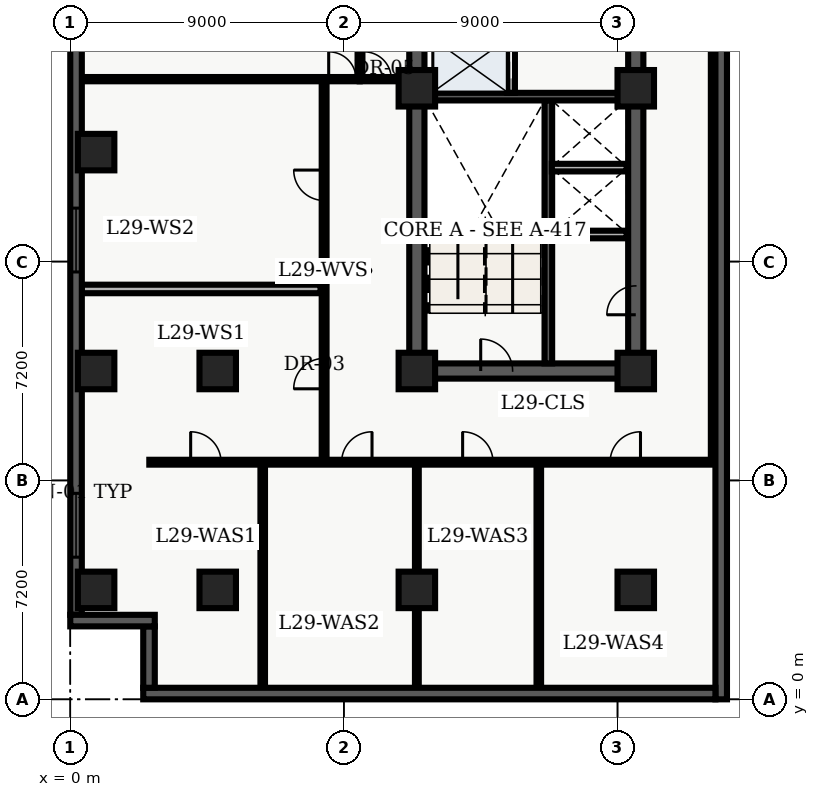
"""IFC4 building model, lengths in metres.
Left out: names, types, materials, properties, quantities, classifications, styles, units other than length and angle.
Written with IfcOpenShell. Run it as: python <this file> out.ifc"""

import sys

from ifc_helpers import new_model, entity, si_unit, converted_unit, direction, frame, origin_with_axes, origin_2d_with_axis, place, context, subcontext, project, spatial, polyline, rectangle, outline, extrude, element, fill, save


model = new_model("IFC4")
c1 = context("Model", 3, precision=1e-05, world=origin_with_axes(), true_north=direction((0.0, 1.0)))
c2 = subcontext(c1, "Body", "Model", "MODEL_VIEW")
j1 = project(units=[si_unit("LENGTHUNIT", "METRE"), converted_unit("PLANEANGLEUNIT", "DEGREE", entity("IfcPlaneAngleMeasure", 0.017), si_unit("PLANEANGLEUNIT", "RADIAN"), dimensions=[0, 0, 0, 0, 0, 0, 0])], contexts=[c1])
p1 = place(None, origin_with_axes())
s1 = spatial("IfcSite", under=j1, at=p1, CompositionType="ELEMENT")
p2 = place(p1, origin_with_axes())
s2 = spatial("IfcBuilding", under=s1, at=p2, CompositionType="ELEMENT")
p3 = place(p2, frame((0.0, 0.0, 120.3), z_axis=(0.0, 0.0, 1.0), x_axis=(1.0, 0.0, 0.0)))
s3 = spatial("IfcBuildingStorey", under=s2, at=p3, CompositionType="ELEMENT", Elevation=120.3)
p4 = place(p3, frame((11.4, 10.8, 0.0), z_axis=(0.0, 0.0, 1.0), x_axis=(0.0, 1.0, 0.0)))
e1 = element("IfcWall", 1, at=p4, inside=s3, PredefinedType="SHEAR", context=c2, shape_type="SweptSolid", body=[
    extrude(outline(polyline([(0.0, -0.25), (27.0, -0.25), (27.0, 0.25), (0.0, 0.25), (0.0, -0.25)])), origin_with_axes(), (0.0, 0.0, 1.0), 3.6),
])
p5 = place(p3, frame((11.4, 10.8, 0.0), z_axis=(0.0, 0.0, 1.0), x_axis=(1.0, 0.0, 0.0)))
e2 = element("IfcWall", 2, at=p5, inside=s3, PredefinedType="SHEAR", context=c2, shape_type="SweptSolid", body=[
    extrude(outline(polyline([(0.0, -0.25), (7.2, -0.25), (7.2, 0.25), (0.0, 0.25), (0.0, -0.25)])), origin_with_axes(), (0.0, 0.0, 1.0), 3.6),
])
p6 = place(p5, frame((2.625, 0.0, 0.0), z_axis=(0.0, 0.0, 1.0), x_axis=(1.0, 0.0, 0.0)))
e3 = element("IfcOpeningElement", 3, at=p6, cuts=e2, PredefinedType="OPENING", context=c2, shape_type="SweptSolid", body=[
    extrude(rectangle(XDim=1.05, YDim=0.52, at=origin_2d_with_axis()), origin_with_axes(), (0.0, 0.0, 1.0), 2.15),
])
p7 = place(p3, frame((18.6, 10.8, 0.0), z_axis=(0.0, 0.0, 1.0), x_axis=(0.0, 1.0, 0.0)))
e4 = element("IfcWall", 4, at=p7, inside=s3, PredefinedType="SHEAR", context=c2, shape_type="SweptSolid", body=[
    extrude(outline(polyline([(0.0, -0.25), (13.5, -0.25), (13.5, 0.25), (0.0, 0.25), (0.0, -0.25)])), origin_with_axes(), (0.0, 0.0, 1.0), 3.6),
])
p8 = place(p7, frame((11.125, 0.0, 0.0), z_axis=(0.0, 0.0, 1.0), x_axis=(1.0, 0.0, 0.0)))
e5 = element("IfcOpeningElement", 5, at=p8, cuts=e4, PredefinedType="OPENING", context=c2, shape_type="SweptSolid", body=[
    extrude(rectangle(XDim=1.05, YDim=0.52, at=origin_2d_with_axis()), origin_with_axes(), (0.0, 0.0, 1.0), 2.15),
])
p9 = place(p7, frame((2.325, 0.0, 0.0), z_axis=(0.0, 0.0, 1.0), x_axis=(1.0, 0.0, 0.0)))
e6 = element("IfcOpeningElement", 6, at=p9, cuts=e4, PredefinedType="OPENING", context=c2, shape_type="SweptSolid", body=[
    extrude(rectangle(XDim=0.95, YDim=0.52, at=origin_2d_with_axis()), origin_with_axes(), (0.0, 0.0, 1.0), 2.15),
])
p10 = place(p3, frame((15.725, 11.05, 0.0), z_axis=(0.0, 0.0, 1.0), x_axis=(0.0, 1.0, 0.0)))
e7 = element("IfcWall", 7, at=p10, inside=s3, PredefinedType="SHEAR", context=c2, shape_type="SweptSolid", body=[
    extrude(outline(polyline([(0.0, -0.125), (8.65, -0.125), (8.65, 0.125), (0.0, 0.125), (0.0, -0.125)])), origin_with_axes(), (0.0, 0.0, 1.0), 3.6),
])
p11 = place(p3, frame((11.65, 19.825, 0.0), z_axis=(0.0, 0.0, 1.0), x_axis=(1.0, 0.0, 0.0)))
e8 = element("IfcWall", 8, at=p11, inside=s3, PredefinedType="SHEAR", context=c2, shape_type="SweptSolid", body=[
    extrude(outline(polyline([(0.0, -0.125), (6.7, -0.125), (6.7, 0.125), (0.0, 0.125), (0.0, -0.125)])), origin_with_axes(), (0.0, 0.0, 1.0), 3.6),
])
p12 = place(p3, frame((14.5, 19.95, 0.0), z_axis=(0.0, 0.0, 1.0), x_axis=(0.0, 1.0, 0.0)))
e9 = element("IfcWall", 9, at=p12, inside=s3, PredefinedType="SOLIDWALL", context=c2, shape_type="SweptSolid", body=[
    extrude(outline(polyline([(0.0, -0.125), (6.25, -0.125), (6.25, 0.125), (0.0, 0.125), (0.0, -0.125)])), origin_with_axes(), (0.0, 0.0, 1.0), 2.64),
])
p13 = place(p12, frame((1.025, 0.0, 0.0), z_axis=(0.0, 0.0, 1.0), x_axis=(1.0, 0.0, 0.0)))
e10 = element("IfcOpeningElement", 10, at=p13, cuts=e9, PredefinedType="OPENING", context=c2, shape_type="SweptSolid", body=[
    extrude(rectangle(XDim=1.1, YDim=0.27, at=origin_2d_with_axis()), origin_with_axes(), (0.0, 0.0, 1.0), 2.15),
])
p14 = place(p12, frame((2.975, 0.0, 0.0), z_axis=(0.0, 0.0, 1.0), x_axis=(1.0, 0.0, 0.0)))
e11 = element("IfcOpeningElement", 11, at=p14, cuts=e9, PredefinedType="OPENING", context=c2, shape_type="SweptSolid", body=[
    extrude(rectangle(XDim=1.1, YDim=0.27, at=origin_2d_with_axis()), origin_with_axes(), (0.0, 0.0, 1.0), 2.15),
])
p15 = place(p12, frame((5.425, 0.0, 0.0), z_axis=(0.0, 0.0, 1.0), x_axis=(1.0, 0.0, 0.0)))
e12 = element("IfcOpeningElement", 12, at=p15, cuts=e9, PredefinedType="OPENING", context=c2, shape_type="SweptSolid", body=[
    extrude(rectangle(XDim=1.2, YDim=0.27, at=origin_2d_with_axis()), origin_with_axes(), (0.0, 0.0, 1.0), 2.15),
])
for number, where, z_axis, x_axis in (
    (13, (11.4, 3.6, 0.0), (0.0, 0.0, 1.0), (1.0, 0.0, 0.0)),
    (14, (11.4, 10.8, 0.0), (0.0, 0.0, 1.0), (1.0, 0.0, 0.0)),
    (15, (11.4, 20.1, 0.0), (0.0, 0.0, 1.0), (1.0, 0.0, 0.0)),
    (16, (18.6, 3.6, 0.0), (0.0, 0.0, 1.0), (1.0, 0.0, 0.0)),
    (17, (18.6, 10.8, 0.0), (0.0, 0.0, 1.0), (1.0, 0.0, 0.0)),
    (18, (18.6, 20.1, 0.0), (0.0, 0.0, 1.0), (1.0, 0.0, 0.0)),
    (19, (4.85, 3.6, 0.0), (0.0, 0.0, 1.0), (1.0, 0.0, 0.0)),
    (20, (4.85, 10.8, 0.0), (0.0, 0.0, 1.0), (1.0, 0.0, 0.0)),
    (21, (0.85, 3.6, 0.0), (0.0, 0.0, 1.0), (1.0, 0.0, 0.0)),
    (22, (0.85, 10.8, 0.0), (0.0, 0.0, 1.0), (1.0, 0.0, 0.0)),
    (23, (0.85, 18.0, 0.0), (0.0, 0.0, 1.0), (1.0, 0.0, 0.0)),
):
    element("IfcColumn", number, at=place(p3, frame(where, z_axis=z_axis, x_axis=x_axis)), inside=s3, PredefinedType="COLUMN", context=c2, shape_type="SweptSolid", body=[
        extrude(rectangle(XDim=1.2, YDim=1.2, at=origin_2d_with_axis()), origin_with_axes(), (0.0, 0.0, 1.0), 3.9),
    ])
for number, where, z_axis, x_axis in (
    (24, (15.84, 15.29, 0.0), (0.0, 0.0, 1.0), (1.0, 0.0, 0.0)),
    (25, (15.84, 17.49, 0.0), (0.0, 0.0, 1.0), (1.0, 0.0, 0.0)),
):
    element("IfcWall", number, at=place(p3, frame(where, z_axis=z_axis, x_axis=x_axis)), inside=s3, PredefinedType="SOLIDWALL", context=c2, shape_type="SweptSolid", body=[
        extrude(outline(polyline([(0.0, -0.125), (2.46, -0.125), (2.46, 0.125), (0.0, 0.125), (0.0, -0.125)])), origin_with_axes(), (0.0, 0.0, 1.0), 2.64),
    ])
p16 = place(p3, frame((9.52, 20.4, 0.0), z_axis=(0.0, 0.0, 1.0), x_axis=(0.0, 1.0, 0.0)))
e26 = element("IfcWall", 26, at=p16, inside=s3, PredefinedType="PARTITIONING", context=c2, shape_type="SweptSolid", body=[
    extrude(outline(polyline([(0.0, -0.07), (4.0, -0.07), (4.0, 0.07), (0.0, 0.07), (0.0, -0.07)])), origin_with_axes(), (0.0, 0.0, 1.0), 2.64),
])
p17 = place(p3, frame((9.52, 20.4, 0.0), z_axis=(0.0, 0.0, 1.0), x_axis=(1.0, 0.0, 0.0)))
e27 = element("IfcWall", 27, at=p17, inside=s3, PredefinedType="PARTITIONING", context=c2, shape_type="SweptSolid", body=[
    extrude(outline(polyline([(0.0, -0.07), (1.58, -0.07), (1.58, 0.07), (0.0, 0.07), (0.0, -0.07)])), origin_with_axes(), (0.0, 0.0, 1.0), 2.64),
])
p18 = place(p17, frame((0.59, 0.0, 0.0), z_axis=(0.0, 0.0, 1.0), x_axis=(1.0, 0.0, 0.0)))
e28 = element("IfcOpeningElement", 28, at=p18, cuts=e27, PredefinedType="OPENING", context=c2, shape_type="SweptSolid", body=[
    extrude(rectangle(XDim=0.9, YDim=0.16, at=origin_2d_with_axis()), origin_with_axes(), (0.0, 0.0, 1.0), 2.15),
])
p19 = place(p3, frame((2.6, 7.8, 0.0), z_axis=(0.0, 0.0, 1.0), x_axis=(1.0, 0.0, 0.0)))
e29 = element("IfcWall", 29, at=p19, inside=s3, PredefinedType="PARTITIONING", context=c2, shape_type="SweptSolid", body=[
    extrude(outline(polyline([(0.0, -0.08), (18.625, -0.08), (18.625, 0.08), (0.0, 0.08), (0.0, -0.08)])), origin_with_axes(), (0.0, 0.0, 1.0), 2.64),
])
p20 = place(p19, frame((1.86, 0.0, 0.0), z_axis=(0.0, 0.0, 1.0), x_axis=(1.0, 0.0, 0.0)))
e30 = element("IfcOpeningElement", 30, at=p20, cuts=e29, PredefinedType="OPENING", context=c2, shape_type="SweptSolid", body=[
    extrude(rectangle(XDim=1.0, YDim=0.18, at=origin_2d_with_axis()), origin_with_axes(), (0.0, 0.0, 1.0), 2.15),
])
p21 = place(p19, frame((6.825, 0.0, 0.0), z_axis=(0.0, 0.0, 1.0), x_axis=(1.0, 0.0, 0.0)))
e31 = element("IfcOpeningElement", 31, at=p21, cuts=e29, PredefinedType="OPENING", context=c2, shape_type="SweptSolid", body=[
    extrude(rectangle(XDim=1.0, YDim=0.18, at=origin_2d_with_axis()), origin_with_axes(), (0.0, 0.0, 1.0), 2.15),
])
p22 = place(p19, frame((10.806, 0.0, 0.0), z_axis=(0.0, 0.0, 1.0), x_axis=(1.0, 0.0, 0.0)))
e32 = element("IfcOpeningElement", 32, at=p22, cuts=e29, PredefinedType="OPENING", context=c2, shape_type="SweptSolid", body=[
    extrude(rectangle(XDim=1.0, YDim=0.18, at=origin_2d_with_axis()), origin_with_axes(), (0.0, 0.0, 1.0), 2.15),
])
p23 = place(p19, frame((15.655, 0.0, 0.0), z_axis=(0.0, 0.0, 1.0), x_axis=(1.0, 0.0, 0.0)))
e33 = element("IfcOpeningElement", 33, at=p23, cuts=e29, PredefinedType="OPENING", context=c2, shape_type="SweptSolid", body=[
    extrude(rectangle(XDim=1.0, YDim=0.18, at=origin_2d_with_axis()), origin_with_axes(), (0.0, 0.0, 1.0), 2.15),
])
p24 = place(p3, frame((21.15, 7.8, 0.0), z_axis=(0.0, 0.0, 1.0), x_axis=(0.0, 1.0, 0.0)))
e34 = element("IfcWall", 34, at=p24, inside=s3, PredefinedType="PARTITIONING", context=c2, shape_type="SweptSolid", body=[
    extrude(outline(polyline([(0.0, -0.08), (32.7, -0.08), (32.7, 0.08), (0.0, 0.08), (0.0, -0.08)])), origin_with_axes(), (0.0, 0.0, 1.0), 2.64),
])
p25 = place(p3, frame((8.35, 7.8, 0.0), z_axis=(0.0, 0.0, 1.0), x_axis=(0.0, 1.0, 0.0)))
e35 = element("IfcWall", 35, at=p25, inside=s3, PredefinedType="PARTITIONING", context=c2, shape_type="SweptSolid", body=[
    extrude(outline(polyline([(0.0, -0.08), (12.6, -0.08), (12.6, 0.08), (0.0, 0.08), (0.0, -0.08)])), origin_with_axes(), (0.0, 0.0, 1.0), 2.64),
])
p26 = place(p25, frame((2.914, 0.0, 0.0), z_axis=(0.0, 0.0, 1.0), x_axis=(1.0, 0.0, 0.0)))
e36 = element("IfcOpeningElement", 36, at=p26, cuts=e35, PredefinedType="OPENING", context=c2, shape_type="SweptSolid", body=[
    extrude(rectangle(XDim=1.0, YDim=0.18, at=origin_2d_with_axis()), origin_with_axes(), (0.0, 0.0, 1.0), 2.15),
])
p27 = place(p25, frame((9.11, 0.0, 0.0), z_axis=(0.0, 0.0, 1.0), x_axis=(1.0, 0.0, 0.0)))
e37 = element("IfcOpeningElement", 37, at=p27, cuts=e35, PredefinedType="OPENING", context=c2, shape_type="SweptSolid", body=[
    extrude(rectangle(XDim=1.0, YDim=0.18, at=origin_2d_with_axis()), origin_with_axes(), (0.0, 0.0, 1.0), 2.15),
])
p28 = place(p3, frame((0.36, 20.4, 0.0), z_axis=(0.0, 0.0, 1.0), x_axis=(1.0, 0.0, 0.0)))
e38 = element("IfcWall", 38, at=p28, inside=s3, PredefinedType="PARTITIONING", context=c2, shape_type="SweptSolid", body=[
    extrude(outline(polyline([(0.0, -0.07), (9.16, -0.07), (9.16, 0.07), (0.0, 0.07), (0.0, -0.07)])), origin_with_axes(), (0.0, 0.0, 1.0), 2.64),
])
p29 = place(p28, frame((8.59, 0.0, 0.0), z_axis=(0.0, 0.0, 1.0), x_axis=(1.0, 0.0, 0.0)))
e39 = element("IfcOpeningElement", 39, at=p29, cuts=e38, PredefinedType="OPENING", context=c2, shape_type="SweptSolid", body=[
    extrude(rectangle(XDim=0.9, YDim=0.16, at=origin_2d_with_axis()), origin_with_axes(), (0.0, 0.0, 1.0), 2.15),
])
p30 = place(p3, frame((0.375, 13.499, 0.0), z_axis=(0.0, 0.0, 1.0), x_axis=(1.0, 0.0, 0.0)))
e40 = element("IfcWall", 40, at=p30, inside=s3, PredefinedType="PARTITIONING", context=c2, shape_type="SweptSolid", body=[
    extrude(outline(polyline([(0.0, -0.14), (7.855, -0.14), (7.855, 0.14), (0.0, 0.14), (0.0, -0.14)])), origin_with_axes(), (0.0, 0.0, 1.0), 2.64),
])
p31 = place(p3, frame((6.33, 0.36, 0.0), z_axis=(0.0, 0.0, 1.0), x_axis=(0.0, 1.0, 0.0)))
e41 = element("IfcWall", 41, at=p31, inside=s3, PredefinedType="PARTITIONING", context=c2, shape_type="SweptSolid", body=[
    extrude(outline(polyline([(0.0, -0.075), (7.34, -0.075), (7.34, 0.075), (0.0, 0.075), (0.0, -0.075)])), origin_with_axes(), (0.0, 0.0, 1.0), 2.64),
])
p32 = place(p3, frame((11.4, 0.36, 0.0), z_axis=(0.0, 0.0, 1.0), x_axis=(0.0, 1.0, 0.0)))
e42 = element("IfcWall", 42, at=p32, inside=s3, PredefinedType="PARTITIONING", context=c2, shape_type="SweptSolid", body=[
    extrude(outline(polyline([(0.0, -0.062), (7.34, -0.062), (7.34, 0.062), (0.0, 0.062), (0.0, -0.062)])), origin_with_axes(), (0.0, 0.0, 1.0), 2.64),
])
p33 = place(p3, frame((15.411, 0.36, 0.0), z_axis=(0.0, 0.0, 1.0), x_axis=(0.0, 1.0, 0.0)))
e43 = element("IfcWall", 43, at=p33, inside=s3, PredefinedType="PARTITIONING", context=c2, shape_type="SweptSolid", body=[
    extrude(outline(polyline([(0.0, -0.075), (7.34, -0.075), (7.34, 0.075), (0.0, 0.075), (0.0, -0.075)])), origin_with_axes(), (0.0, 0.0, 1.0), 2.64),
])
p34 = place(p3, frame((0.19, 2.78, 0.0), z_axis=(0.0, 0.0, 1.0), x_axis=(0.0, 1.0, 0.0)))
e44 = element("IfcWall", 44, at=p34, inside=s3, PredefinedType="SOLIDWALL", context=c2, shape_type="SweptSolid", body=[
    extrude(outline(polyline([(0.0, -0.19), (43.42, -0.19), (43.42, 0.19), (0.0, 0.19), (0.0, -0.19)])), origin_with_axes(), (0.0, 0.0, 1.0), 3.6),
])
p35 = place(p34, frame((2.946, 0.0, 0.45), z_axis=(0.0, 0.0, 1.0), x_axis=(1.0, 0.0, 0.0)))
e45 = element("IfcOpeningElement", 45, at=p35, cuts=e44, PredefinedType="OPENING", context=c2, shape_type="SweptSolid", body=[
    extrude(rectangle(XDim=2.1, YDim=0.4, at=origin_2d_with_axis()), origin_with_axes(), (0.0, 0.0, 1.0), 2.2),
])
p36 = place(p34, frame((12.328, 0.0, 0.45), z_axis=(0.0, 0.0, 1.0), x_axis=(1.0, 0.0, 0.0)))
e46 = element("IfcOpeningElement", 46, at=p36, cuts=e44, PredefinedType="OPENING", context=c2, shape_type="SweptSolid", body=[
    extrude(rectangle(XDim=2.1, YDim=0.4, at=origin_2d_with_axis()), origin_with_axes(), (0.0, 0.0, 1.0), 2.2),
])
p37 = place(p34, frame((26.401, 0.0, 0.45), z_axis=(0.0, 0.0, 1.0), x_axis=(1.0, 0.0, 0.0)))
e47 = element("IfcOpeningElement", 47, at=p37, cuts=e44, PredefinedType="OPENING", context=c2, shape_type="SweptSolid", body=[
    extrude(rectangle(XDim=2.1, YDim=0.4, at=origin_2d_with_axis()), origin_with_axes(), (0.0, 0.0, 1.0), 2.2),
])
p38 = place(p34, frame((31.092, 0.0, 0.45), z_axis=(0.0, 0.0, 1.0), x_axis=(1.0, 0.0, 0.0)))
e48 = element("IfcOpeningElement", 48, at=p38, cuts=e44, PredefinedType="OPENING", context=c2, shape_type="SweptSolid", body=[
    extrude(rectangle(XDim=2.1, YDim=0.4, at=origin_2d_with_axis()), origin_with_axes(), (0.0, 0.0, 1.0), 2.2),
])
p39 = place(p34, frame((40.024, 0.0, 0.45), z_axis=(0.0, 0.0, 1.0), x_axis=(1.0, 0.0, 0.0)))
e49 = element("IfcOpeningElement", 49, at=p39, cuts=e44, PredefinedType="OPENING", context=c2, shape_type="SweptSolid", body=[
    extrude(rectangle(XDim=2.1, YDim=0.4, at=origin_2d_with_axis()), origin_with_axes(), (0.0, 0.0, 1.0), 2.2),
])
p40 = place(p3, frame((21.41, 45.82, 0.0), z_axis=(0.0, 0.0, 1.0), x_axis=(0.0, -1.0, 0.0)))
e50 = element("IfcWall", 50, at=p40, inside=s3, PredefinedType="SOLIDWALL", context=c2, shape_type="SweptSolid", body=[
    extrude(outline(polyline([(0.0, -0.19), (45.82, -0.19), (45.82, 0.19), (0.0, 0.19), (0.0, -0.19)])), origin_with_axes(), (0.0, 0.0, 1.0), 3.6),
])
p41 = place(p40, frame((3.079, 0.0, 0.45), z_axis=(0.0, 0.0, 1.0), x_axis=(1.0, 0.0, 0.0)))
e51 = element("IfcOpeningElement", 51, at=p41, cuts=e50, PredefinedType="OPENING", context=c2, shape_type="SweptSolid", body=[
    extrude(rectangle(XDim=2.1, YDim=0.4, at=origin_2d_with_axis()), origin_with_axes(), (0.0, 0.0, 1.0), 2.2),
])
p42 = place(p3, frame((21.22, 0.19, 0.0), z_axis=(0.0, 0.0, 1.0), x_axis=(-1.0, 0.0, 0.0)))
e52 = element("IfcWall", 52, at=p42, inside=s3, PredefinedType="SOLIDWALL", context=c2, shape_type="SweptSolid", body=[
    extrude(outline(polyline([(0.0, -0.19), (18.82, -0.19), (18.82, 0.19), (0.0, 0.19), (0.0, -0.19)])), origin_with_axes(), (0.0, 0.0, 1.0), 3.6),
])
p43 = place(p3, frame((2.59, 0.38, 0.0), z_axis=(0.0, 0.0, 1.0), x_axis=(0.0, 1.0, 0.0)))
e53 = element("IfcWall", 53, at=p43, inside=s3, PredefinedType="SOLIDWALL", context=c2, shape_type="SweptSolid", body=[
    extrude(outline(polyline([(0.0, -0.19), (2.02, -0.19), (2.02, 0.19), (0.0, 0.19), (0.0, -0.19)])), origin_with_axes(), (0.0, 0.0, 1.0), 3.6),
])
p44 = place(p3, frame((2.78, 2.59, 0.0), z_axis=(0.0, 0.0, 1.0), x_axis=(-1.0, 0.0, 0.0)))
e54 = element("IfcWall", 54, at=p44, inside=s3, PredefinedType="SOLIDWALL", context=c2, shape_type="SweptSolid", body=[
    extrude(outline(polyline([(0.0, -0.19), (2.78, -0.19), (2.78, 0.19), (0.0, 0.19), (0.0, -0.19)])), origin_with_axes(), (0.0, 0.0, 1.0), 3.6),
])
p45 = place(p12, frame((1.025, 0.0, 0.0), z_axis=(0.0, 0.0, 1.0), x_axis=(1.0, 0.0, 0.0)))
e55 = element("IfcDoor", 55, at=p45, inside=s3, OperationType="SLIDING_TO_LEFT", PredefinedType="DOOR", context=c2, shape_type="SweptSolid", body=[
    extrude(rectangle(XDim=1.1, YDim=0.09, at=origin_2d_with_axis()), origin_with_axes(), (0.0, 0.0, 1.0), 2.15),
])
fill(e10, e55)
p46 = place(p5, frame((2.625, 0.0, 0.0), z_axis=(0.0, 0.0, 1.0), x_axis=(1.0, 0.0, 0.0)))
e56 = element("IfcDoor", 56, at=p46, inside=s3, OperationType="SINGLE_SWING_LEFT", PredefinedType="DOOR", context=c2, shape_type="SweptSolid", body=[
    extrude(rectangle(XDim=1.05, YDim=0.09, at=origin_2d_with_axis()), origin_with_axes(), (0.0, 0.0, 1.0), 2.15),
])
fill(e3, e56)
p47 = place(p7, frame((2.325, 0.0, 0.0), z_axis=(0.0, 0.0, 1.0), x_axis=(1.0, 0.0, 0.0)))
e57 = element("IfcDoor", 57, at=p47, inside=s3, OperationType="SINGLE_SWING_LEFT", PredefinedType="DOOR", context=c2, shape_type="SweptSolid", body=[
    extrude(rectangle(XDim=0.95, YDim=0.09, at=origin_2d_with_axis()), origin_with_axes(), (0.0, 0.0, 1.0), 2.15),
])
fill(e6, e57)
p48 = place(p17, frame((0.59, 0.0, 0.0), z_axis=(0.0, 0.0, 1.0), x_axis=(1.0, 0.0, 0.0)))
e58 = element("IfcDoor", 58, at=p48, inside=s3, OperationType="SINGLE_SWING_LEFT", PredefinedType="DOOR", context=c2, shape_type="SweptSolid", body=[
    extrude(rectangle(XDim=0.9, YDim=0.084, at=origin_2d_with_axis()), origin_with_axes(), (0.0, 0.0, 1.0), 2.15),
])
fill(e28, e58)
p49 = place(p28, frame((8.59, 0.0, 0.0), z_axis=(0.0, 0.0, 1.0), x_axis=(1.0, 0.0, 0.0)))
e59 = element("IfcDoor", 59, at=p49, inside=s3, OperationType="SINGLE_SWING_LEFT", PredefinedType="DOOR", context=c2, shape_type="SweptSolid", body=[
    extrude(rectangle(XDim=0.9, YDim=0.084, at=origin_2d_with_axis()), origin_with_axes(), (0.0, 0.0, 1.0), 2.15),
])
fill(e39, e59)
p50 = place(p25, frame((2.914, 0.0, 0.0), z_axis=(0.0, 0.0, 1.0), x_axis=(1.0, 0.0, 0.0)))
e60 = element("IfcDoor", 60, at=p50, inside=s3, OperationType="SINGLE_SWING_LEFT", PredefinedType="DOOR", context=c2, shape_type="SweptSolid", body=[
    extrude(rectangle(XDim=1.0, YDim=0.09, at=origin_2d_with_axis()), origin_with_axes(), (0.0, 0.0, 1.0), 2.15),
])
fill(e36, e60)
p51 = place(p25, frame((9.11, 0.0, 0.0), z_axis=(0.0, 0.0, 1.0), x_axis=(1.0, 0.0, 0.0)))
e61 = element("IfcDoor", 61, at=p51, inside=s3, OperationType="SINGLE_SWING_RIGHT", PredefinedType="DOOR", context=c2, shape_type="SweptSolid", body=[
    extrude(rectangle(XDim=1.0, YDim=0.09, at=origin_2d_with_axis()), origin_with_axes(), (0.0, 0.0, 1.0), 2.15),
])
fill(e37, e61)
p52 = place(p19, frame((1.86, 0.0, 0.0), z_axis=(0.0, 0.0, 1.0), x_axis=(1.0, 0.0, 0.0)))
e62 = element("IfcDoor", 62, at=p52, inside=s3, OperationType="SINGLE_SWING_LEFT", PredefinedType="DOOR", context=c2, shape_type="SweptSolid", body=[
    extrude(rectangle(XDim=1.0, YDim=0.09, at=origin_2d_with_axis()), origin_with_axes(), (0.0, 0.0, 1.0), 2.15),
])
fill(e30, e62)
p53 = place(p19, frame((6.825, 0.0, 0.0), z_axis=(0.0, 0.0, 1.0), x_axis=(1.0, 0.0, 0.0)))
e63 = element("IfcDoor", 63, at=p53, inside=s3, OperationType="SINGLE_SWING_RIGHT", PredefinedType="DOOR", context=c2, shape_type="SweptSolid", body=[
    extrude(rectangle(XDim=1.0, YDim=0.09, at=origin_2d_with_axis()), origin_with_axes(), (0.0, 0.0, 1.0), 2.15),
])
fill(e31, e63)
p54 = place(p19, frame((10.806, 0.0, 0.0), z_axis=(0.0, 0.0, 1.0), x_axis=(1.0, 0.0, 0.0)))
e64 = element("IfcDoor", 64, at=p54, inside=s3, OperationType="SINGLE_SWING_LEFT", PredefinedType="DOOR", context=c2, shape_type="SweptSolid", body=[
    extrude(rectangle(XDim=1.0, YDim=0.09, at=origin_2d_with_axis()), origin_with_axes(), (0.0, 0.0, 1.0), 2.15),
])
fill(e32, e64)
p55 = place(p19, frame((15.655, 0.0, 0.0), z_axis=(0.0, 0.0, 1.0), x_axis=(1.0, 0.0, 0.0)))
e65 = element("IfcDoor", 65, at=p55, inside=s3, OperationType="SINGLE_SWING_RIGHT", PredefinedType="DOOR", context=c2, shape_type="SweptSolid", body=[
    extrude(rectangle(XDim=1.0, YDim=0.09, at=origin_2d_with_axis()), origin_with_axes(), (0.0, 0.0, 1.0), 2.15),
])
fill(e33, e65)
p56 = place(p34, frame((2.946, 0.0, 0.45), z_axis=(0.0, 0.0, 1.0), x_axis=(1.0, 0.0, 0.0)))
e66 = element("IfcWindow", 66, at=p56, inside=s3, PredefinedType="WINDOW", context=c2, shape_type="SweptSolid", body=[
    extrude(rectangle(XDim=2.1, YDim=0.09, at=origin_2d_with_axis()), origin_with_axes(), (0.0, 0.0, 1.0), 2.2),
])
fill(e45, e66)
p57 = place(p34, frame((12.328, 0.0, 0.45), z_axis=(0.0, 0.0, 1.0), x_axis=(1.0, 0.0, 0.0)))
e67 = element("IfcWindow", 67, at=p57, inside=s3, PredefinedType="WINDOW", context=c2, shape_type="SweptSolid", body=[
    extrude(rectangle(XDim=2.1, YDim=0.09, at=origin_2d_with_axis()), origin_with_axes(), (0.0, 0.0, 1.0), 2.2),
])
fill(e46, e67)
save(model, sys.argv[1])
